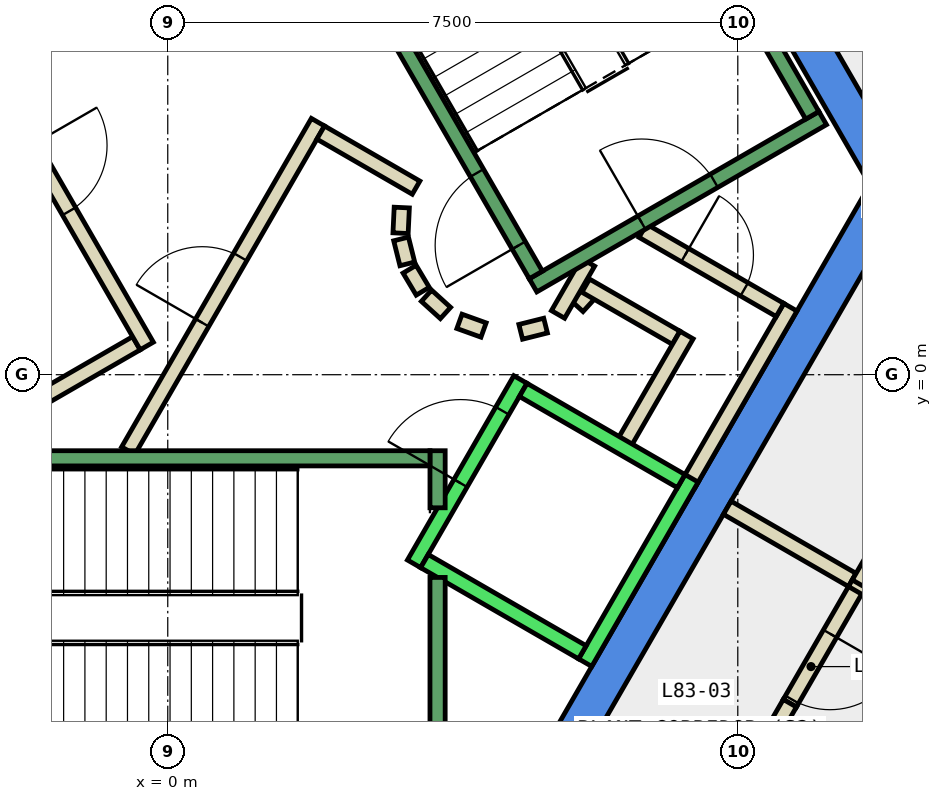
"""IFC4 building model, lengths in metres.
Left out: names, types, materials, properties, quantities, classifications, styles, units other than length and angle.
Written with IfcOpenShell. Run it as: python <this file> out.ifc"""

import sys

from ifc_helpers import new_model, si_unit, direction, frame, frame_2d, origin, place, context, subcontext, project, spatial, polyline, rectangle, outline, extrude, element, fill, save


model = new_model("IFC4")
c1 = context("Model", 3, precision=1e-05, world=origin(), true_north=direction((0.0, 1.0)))
c2 = subcontext(c1, "Body", "Model", "MODEL_VIEW")
j1 = project(units=[si_unit("LENGTHUNIT", "METRE"), si_unit("PLANEANGLEUNIT", "RADIAN")], contexts=[c1])
p1 = place(None, origin())
s1 = spatial("IfcSite", under=j1, at=p1, CompositionType="ELEMENT")
p2 = place(p1, origin())
s2 = spatial("IfcBuilding", under=s1, at=p2, CompositionType="ELEMENT")
p3 = place(p2, frame((0.0, 0.0, 353.9)))
s3 = spatial("IfcBuildingStorey", under=s2, at=p3, CompositionType="ELEMENT", Elevation=353.9)
p4 = place(p3, frame((0.0, 0.0, -0.35)))
e1 = element("IfcWall", 1, at=p4, inside=s3, PredefinedType="SHEAR", context=c2, shape_type="SweptSolid", body=[
    extrude(outline(polyline([(5.486, 9.998), (5.053, 9.748), (9.238, 2.5), (9.815, 2.5), (5.486, 9.998)])), origin(), (0.0, 0.0, 1.0), 4.4),
])
p5 = place(p3, frame((0.0, 0.0, -0.35)))
e2 = element("IfcWall", 2, at=p5, inside=s3, PredefinedType="SHEAR", context=c2, shape_type="SweptSolid", body=[
    extrude(outline(polyline([(4.907, -6.0), (9.815, 2.5), (9.238, 2.5), (4.619, -5.5), (4.907, -6.0)])), origin(), (0.0, 0.0, 1.0), 4.4),
])
p6 = place(p3, frame((5.39, 0.898, 0.0), z_axis=(0.0, 0.0, 1.0), x_axis=(0.673828488714, 0.738887791073, 0.0)))
e3 = element("IfcWall", 3, at=p6, inside=s3, PredefinedType="PARTITIONING", context=c2, shape_type="SweptSolid", body=[
    extrude(rectangle(XDim=0.263, YDim=0.2, at=frame_2d((0.131, 0.0))), origin(), (0.0, 0.0, 1.0), 4.05),
])
p7 = place(p3, frame((5.499, 1.172, 0.0), z_axis=(0.0, 0.0, 1.0), x_axis=(0.866333505267, -0.499465972466, 0.0)))
e4 = element("IfcWall", 4, at=p7, inside=s3, PredefinedType="PARTITIONING", context=c2, shape_type="SweptSolid", body=[
    extrude(rectangle(XDim=1.374, YDim=0.2, at=frame_2d((0.687, 0.0))), origin(), (0.0, 0.0, 1.0), 4.05),
])
p8 = place(p3, frame((6.826, 0.522, 0.0), z_axis=(0.0, 0.0, 1.0), x_axis=(-0.500016722714, -0.866015748706, 0.0)))
e5 = element("IfcWall", 5, at=p8, inside=s3, PredefinedType="PARTITIONING", context=c2, shape_type="SweptSolid", body=[
    extrude(rectangle(XDim=1.7, YDim=0.2, at=frame_2d((0.85, 0.0))), origin(), (0.0, 0.0, 1.0), 4.05),
])
p9 = place(p3, frame((8.192, 0.888, 0.0), z_axis=(0.0, 0.0, 1.0), x_axis=(-0.499940625693, -0.866059680843, 0.0)))
e6 = element("IfcWall", 6, at=p9, inside=s3, PredefinedType="PARTITIONING", context=c2, shape_type="SweptSolid", body=[
    extrude(rectangle(XDim=2.68, YDim=0.2, at=frame_2d((1.34, 0.0))), origin(), (0.0, 0.0, 1.0), 4.05),
])
p10 = place(p3, frame((5.135, 0.793, 0.0), z_axis=(0.0, 0.0, 1.0), x_axis=(0.499526442893, 0.866298639529, 0.0)))
e7 = element("IfcWall", 7, at=p10, inside=s3, PredefinedType="PARTITIONING", context=c2, shape_type="SweptSolid", body=[
    extrude(rectangle(XDim=0.791, YDim=0.2, at=frame_2d((0.396, 0.0))), origin(), (0.0, 0.0, 1.0), 4.05),
])
p11 = place(p3, frame((6.25, 1.894, 0.0), z_axis=(0.0, 0.0, 1.0), x_axis=(0.866043184279, -0.499969202016, 0.0)))
e8 = element("IfcWall", 8, at=p11, inside=s3, PredefinedType="PARTITIONING", context=c2, shape_type="SweptSolid", body=[
    extrude(rectangle(XDim=2.084, YDim=0.2, at=frame_2d((1.042, 0.0))), origin(), (0.0, 0.0, 1.0), 4.05),
])
p12 = place(p11, frame((0.642, 0.0, 0.0)))
e9 = element("IfcOpeningElement", 9, at=p12, cuts=e8, PredefinedType="OPENING", context=c2, shape_type="SweptSolid", body=[
    extrude(rectangle(XDim=0.9, YDim=2.1, at=frame_2d((0.45, 1.05))), frame((0.0, 0.11, 0.0), z_axis=(0.0, -1.0, 0.0), x_axis=(1.0, 0.0, 0.0)), (0.0, 0.0, 1.0), 0.22),
])
p13 = place(p3, frame((3.079, 2.199, 0.0), z_axis=(0.0, 0.0, 1.0), x_axis=(-0.047771483479, -0.998858290933, 0.0)))
e10 = element("IfcWall", 10, at=p13, inside=s3, PredefinedType="PARTITIONING", context=c2, shape_type="SweptSolid", body=[
    extrude(rectangle(XDim=0.337, YDim=0.2, at=frame_2d((0.169, 0.0))), origin(), (0.0, 0.0, 1.0), 4.05),
])
p14 = place(p3, frame((3.07, 1.786, 0.0), z_axis=(0.0, 0.0, 1.0), x_axis=(0.242705583207, -0.970099994784, 0.0)))
e11 = element("IfcWall", 11, at=p14, inside=s3, PredefinedType="PARTITIONING", context=c2, shape_type="SweptSolid", body=[
    extrude(rectangle(XDim=0.338, YDim=0.2, at=frame_2d((0.169, 0.0))), origin(), (0.0, 0.0, 1.0), 4.05),
])
for number, where, z_axis, x_axis in (
    (12, (3.182, 1.388, 0.0), (0.0, 0.0, 1.0), (0.512, -0.859, 0.0)),
    (13, (3.404, 1.039, 0.0), (0.0, 0.0, 1.0), (0.74, -0.672, 0.0)),
):
    element("IfcWall", number, at=place(p3, frame(where, z_axis=z_axis, x_axis=x_axis)), inside=s3, PredefinedType="PARTITIONING", context=c2, shape_type="SweptSolid", body=[
        extrude(rectangle(XDim=0.338, YDim=0.2, at=frame_2d((0.169, 0.0))), origin(), (0.0, 0.0, 1.0), 4.05),
    ])
p15 = place(p3, frame((3.838, 0.702, 0.0), z_axis=(0.0, 0.0, 1.0), x_axis=(0.941035081519, -0.338308993895, 0.0)))
e14 = element("IfcWall", 14, at=p15, inside=s3, PredefinedType="PARTITIONING", context=c2, shape_type="SweptSolid", body=[
    extrude(rectangle(XDim=0.337, YDim=0.2, at=frame_2d((0.168, 0.0))), origin(), (0.0, 0.0, 1.0), 4.05),
])
p16 = place(p3, frame((4.644, 0.564, 0.0), z_axis=(0.0, 0.0, 1.0), x_axis=(0.969929076366, 0.243387729394, 0.0)))
e15 = element("IfcWall", 15, at=p16, inside=s3, PredefinedType="PARTITIONING", context=c2, shape_type="SweptSolid", body=[
    extrude(rectangle(XDim=0.337, YDim=0.2, at=frame_2d((0.168, 0.0))), origin(), (0.0, 0.0, 1.0), 4.05),
])
p17 = place(p3, frame((-0.52, -1.0, 0.0), z_axis=(0.0, 0.0, 1.0), x_axis=(0.50011622646, 0.865958290007, 0.0)))
e16 = element("IfcWall", 16, at=p17, inside=s3, PredefinedType="PARTITIONING", context=c2, shape_type="SweptSolid", body=[
    extrude(rectangle(XDim=4.991, YDim=0.2, at=frame_2d((2.496, 0.0))), origin(), (0.0, 0.0, 1.0), 4.05),
])
p18 = place(p17, frame((1.945, 0.0, 0.0)))
e17 = element("IfcOpeningElement", 17, at=p18, cuts=e16, PredefinedType="OPENING", context=c2, shape_type="SweptSolid", body=[
    extrude(rectangle(XDim=1.0, YDim=2.1, at=frame_2d((0.5, 1.05))), frame((0.0, 0.11, 0.0), z_axis=(0.0, -1.0, 0.0), x_axis=(1.0, 0.0, 0.0)), (0.0, 0.0, 1.0), 0.22),
])
p19 = place(p3, frame((2.012, 3.186, 0.0), z_axis=(0.0, 0.0, 1.0), x_axis=(0.865891012941, -0.500232699559, 0.0)))
e18 = element("IfcWall", 18, at=p19, inside=s3, PredefinedType="PARTITIONING", context=c2, shape_type="SweptSolid", body=[
    extrude(rectangle(XDim=1.449, YDim=0.2, at=frame_2d((0.725, 0.0))), origin(), (0.0, 0.0, 1.0), 4.05),
])
p20 = place(p3, frame((-0.412, 0.414, 0.0), z_axis=(0.0, 0.0, 1.0), x_axis=(-0.866017369001, -0.500013916395, 0.0)))
e19 = element("IfcWall", 19, at=p20, inside=s3, PredefinedType="PARTITIONING", context=c2, shape_type="SweptSolid", body=[
    extrude(rectangle(XDim=1.45, YDim=0.2, at=frame_2d((0.725, 0.0))), origin(), (0.0, 0.0, 1.0), 4.05),
])
p21 = place(p3, frame((-2.771, 4.7, 0.0), z_axis=(0.0, 0.0, 1.0), x_axis=(0.499969479948, -0.866043023828, 0.0)))
e20 = element("IfcWall", 20, at=p21, inside=s3, PredefinedType="PARTITIONING", context=c2, shape_type="SweptSolid", body=[
    extrude(rectangle(XDim=4.99, YDim=0.2, at=frame_2d((2.495, 0.0))), origin(), (0.0, 0.0, 1.0), 4.05),
])
p22 = place(p21, frame((1.945, 0.0, 0.0)))
e21 = element("IfcOpeningElement", 21, at=p22, cuts=e20, PredefinedType="OPENING", context=c2, shape_type="SweptSolid", body=[
    extrude(rectangle(XDim=1.0, YDim=2.1, at=frame_2d((0.5, 1.05))), frame((0.0, 0.11, 0.0), z_axis=(0.0, -1.0, 0.0), x_axis=(1.0, 0.0, 0.0)), (0.0, 0.0, 1.0), 0.22),
])
p23 = place(p3, frame((9.093, -2.75, 0.0), z_axis=(0.0, 0.0, 1.0), x_axis=(-0.500145398563, -0.865941441609, 0.0)))
e22 = element("IfcWall", 22, at=p23, inside=s3, PredefinedType="PARTITIONING", context=c2, shape_type="SweptSolid", body=[
    extrude(rectangle(XDim=1.815, YDim=0.2, at=frame_2d((0.908, 0.0))), origin(), (0.0, 0.0, 1.0), 4.05),
])
p24 = place(p23, frame((0.759, 0.0, 0.0)))
e23 = element("IfcOpeningElement", 23, at=p24, cuts=e22, PredefinedType="OPENING", context=c2, shape_type="SweptSolid", body=[
    extrude(rectangle(XDim=1.0, YDim=2.1, at=frame_2d((0.5, 1.05))), frame((0.0, 0.11, 0.0), z_axis=(0.0, -1.0, 0.0), x_axis=(1.0, 0.0, 0.0)), (0.0, 0.0, 1.0), 0.22),
])
p25 = place(p3, frame((7.361, -1.75, 0.0), z_axis=(0.0, 0.0, 1.0), x_axis=(0.865980106173, -0.500078449558, 0.0)))
e24 = element("IfcWall", 24, at=p25, inside=s3, PredefinedType="PARTITIONING", context=c2, shape_type="SweptSolid", body=[
    extrude(rectangle(XDim=1.9, YDim=0.2, at=frame_2d((0.95, 0.0))), origin(), (0.0, 0.0, 1.0), 4.05),
])
p26 = place(p3, frame((9.006, -2.7, 0.0), z_axis=(0.0, 0.0, 1.0), x_axis=(0.866026229868, -0.499998569178, 0.0)))
e25 = element("IfcWall", 25, at=p26, inside=s3, PredefinedType="PARTITIONING", context=c2, shape_type="SweptSolid", body=[
    extrude(rectangle(XDim=8.572, YDim=0.2, at=frame_2d((4.286, 0.0))), origin(), (0.0, 0.0, 1.0), 4.05),
])
p27 = place(p3, frame((8.185, -4.322, 0.0), z_axis=(0.0, 0.0, 1.0), x_axis=(-0.500265973451, -0.865871789474, 0.0)))
e26 = element("IfcWall", 26, at=p27, inside=s3, PredefinedType="PARTITIONING", context=c2, shape_type="SweptSolid", body=[
    extrude(rectangle(XDim=0.7, YDim=0.2, at=frame_2d((0.35, 0.0))), origin(), (0.0, 0.0, 1.0), 1.95),
])
p28 = place(p3, frame((9.378, -2.257, 0.0), z_axis=(0.0, 0.0, 1.0), x_axis=(-0.500427620203, -0.86577837634, 0.0)))
e27 = element("IfcWall", 27, at=p28, inside=s3, PredefinedType="PARTITIONING", context=c2, shape_type="SweptSolid", body=[
    extrude(rectangle(XDim=0.569, YDim=0.2, at=frame_2d((0.285, 0.0))), origin(), (0.0, 0.0, 1.0), 4.05),
])
p29 = place(p3, frame((3.24, -2.488, 0.0), z_axis=(0.0, 0.0, 1.0), x_axis=(0.49994636267, 0.866056369097, 0.0)))
e28 = element("IfcWall", 28, at=p29, inside=s3, PredefinedType="STANDARD", context=c2, shape_type="SweptSolid", body=[
    extrude(rectangle(XDim=2.8, YDim=0.2, at=frame_2d((1.4, 0.0))), origin(), (0.0, 0.0, 1.0), 4.05),
])
p30 = place(p29, frame((1.225, 0.0, 0.0)))
e29 = element("IfcOpeningElement", 29, at=p30, cuts=e28, PredefinedType="OPENING", context=c2, shape_type="SweptSolid", body=[
    extrude(rectangle(XDim=1.1, YDim=2.1, at=frame_2d((0.55, 1.05))), frame((0.0, 0.11, 0.0), z_axis=(0.0, -1.0, 0.0), x_axis=(1.0, 0.0, 0.0)), (0.0, 0.0, 1.0), 0.22),
])
p31 = place(p3, frame((5.492, -3.788, 0.0), z_axis=(0.0, 0.0, 1.0), x_axis=(0.500011755427, 0.866018616679, 0.0)))
e30 = element("IfcWall", 30, at=p31, inside=s3, PredefinedType="STANDARD", context=c2, shape_type="SweptSolid", body=[
    extrude(rectangle(XDim=2.8, YDim=0.2, at=frame_2d((1.4, 0.0))), origin(), (0.0, 0.0, 1.0), 4.05),
])
p32 = place(p3, frame((3.377, -2.452, 0.0), z_axis=(0.0, 0.0, 1.0), x_axis=(0.865955154139, -0.50012165622, 0.0)))
e31 = element("IfcWall", 31, at=p32, inside=s3, PredefinedType="STANDARD", context=c2, shape_type="SweptSolid", body=[
    extrude(rectangle(XDim=2.4, YDim=0.2, at=frame_2d((1.2, 0.0))), origin(), (0.0, 0.0, 1.0), 4.05),
])
p33 = place(p3, frame((4.677, -0.2, 0.0), z_axis=(0.0, 0.0, 1.0), x_axis=(0.865973769406, -0.500089422704, 0.0)))
e32 = element("IfcWall", 32, at=p33, inside=s3, PredefinedType="STANDARD", context=c2, shape_type="SweptSolid", body=[
    extrude(rectangle(XDim=2.399, YDim=0.2, at=frame_2d((1.2, 0.0))), origin(), (0.0, 0.0, 1.0), 4.05),
])
p34 = place(p3, frame((3.55, -2.667, 0.0), z_axis=(0.0, 0.0, 1.0), x_axis=(0.0, -1.0, 0.0)))
e33 = element("IfcWall", 33, at=p34, inside=s3, PredefinedType="STANDARD", context=c2, shape_type="SweptSolid", body=[
    extrude(rectangle(XDim=2.733, YDim=0.2, at=frame_2d((1.366, 0.0))), origin(), (0.0, 0.0, 1.0), 4.05),
])
p35 = place(p3, frame((3.55, -1.0, 0.0), z_axis=(0.0, 0.0, 1.0), x_axis=(0.0, -1.0, 0.0)))
e34 = element("IfcWall", 34, at=p35, inside=s3, PredefinedType="STANDARD", context=c2, shape_type="SweptSolid", body=[
    extrude(rectangle(XDim=0.751, YDim=0.2, at=frame_2d((0.375, 0.0))), origin(), (0.0, 0.0, 1.0), 4.05),
])
p36 = place(p3, frame((-3.45, -1.1, 0.0), z_axis=(0.0, 0.0, 1.0), x_axis=(1.0, 0.0, 0.0)))
e35 = element("IfcWall", 35, at=p36, inside=s3, PredefinedType="STANDARD", context=c2, shape_type="SweptSolid", body=[
    extrude(rectangle(XDim=6.9, YDim=0.2, at=frame_2d((3.45, 0.0))), origin(), (0.0, 0.0, 1.0), 4.05),
])
p37 = place(p36, frame((0.45, 0.0, 0.0)))
e36 = element("IfcOpeningElement", 36, at=p37, cuts=e35, PredefinedType="OPENING", context=c2, shape_type="SweptSolid", body=[
    extrude(rectangle(XDim=1.1, YDim=2.2, at=frame_2d((0.55, 1.1))), frame((0.0, 0.11, 0.0), z_axis=(0.0, -1.0, 0.0), x_axis=(1.0, 0.0, 0.0)), (0.0, 0.0, 1.0), 0.22),
])
p38 = place(p3, frame((4.806, 1.176, 0.0), z_axis=(0.0, 0.0, 1.0), x_axis=(0.866059941101, 0.499940174841, 0.0)))
e37 = element("IfcWall", 37, at=p38, inside=s3, PredefinedType="STANDARD", context=c2, shape_type="SweptSolid", body=[
    extrude(rectangle(XDim=4.4, YDim=0.2, at=frame_2d((2.2, 0.0))), origin(), (0.0, 0.0, 1.0), 4.05),
])
p39 = place(p38, frame((1.65, 0.0, 0.0)))
e38 = element("IfcOpeningElement", 38, at=p39, cuts=e37, PredefinedType="OPENING", context=c2, shape_type="SweptSolid", body=[
    extrude(rectangle(XDim=1.1, YDim=2.2, at=frame_2d((0.55, 1.1))), frame((0.0, 0.11, 0.0), z_axis=(0.0, -1.0, 0.0), x_axis=(1.0, 0.0, 0.0)), (0.0, 0.0, 1.0), 0.22),
])
p40 = place(p3, frame((4.843, 1.312, 0.0), z_axis=(0.0, 0.0, 1.0), x_axis=(-0.499963383562, 0.866046543262, 0.0)))
e39 = element("IfcWall", 39, at=p40, inside=s3, PredefinedType="STANDARD", context=c2, shape_type="SweptSolid", body=[
    extrude(rectangle(XDim=6.9, YDim=0.2, at=frame_2d((3.45, 0.0))), origin(), (0.0, 0.0, 1.0), 4.05),
])
p41 = place(p40, frame((0.45, 0.0, 0.0)))
e40 = element("IfcOpeningElement", 40, at=p41, cuts=e39, PredefinedType="OPENING", context=c2, shape_type="SweptSolid", body=[
    extrude(rectangle(XDim=1.1, YDim=2.2, at=frame_2d((0.55, 1.1))), frame((0.0, 0.11, 0.0), z_axis=(0.0, -1.0, 0.0), x_axis=(1.0, 0.0, 0.0)), (0.0, 0.0, 1.0), 0.22),
])
p42 = place(p3, frame((8.48, 3.412, 0.0), z_axis=(0.0, 0.0, 1.0), x_axis=(-0.499978703459, 0.866037698999, 0.0)))
e41 = element("IfcWall", 41, at=p42, inside=s3, PredefinedType="STANDARD", context=c2, shape_type="SweptSolid", body=[
    extrude(rectangle(XDim=6.9, YDim=0.2, at=frame_2d((3.45, 0.0))), origin(), (0.0, 0.0, 1.0), 4.05),
])
p43 = place(p3, frame((-1.393, 7.288, 0.0), z_axis=(0.0, 0.0, 1.0), x_axis=(-0.499963383562, -0.866046543262, 0.0)))
e42 = element("IfcWall", 42, at=p43, inside=s3, PredefinedType="STANDARD", context=c2, shape_type="SweptSolid", body=[
    extrude(rectangle(XDim=6.9, YDim=0.2, at=frame_2d((3.45, 0.0))), origin(), (0.0, 0.0, 1.0), 4.05),
])
p44 = place(p43, frame((0.45, 0.0, 0.0)))
e43 = element("IfcOpeningElement", 43, at=p44, cuts=e42, PredefinedType="OPENING", context=c2, shape_type="SweptSolid", body=[
    extrude(rectangle(XDim=1.1, YDim=2.2, at=frame_2d((0.55, 1.1))), frame((0.0, 0.11, 0.0), z_axis=(0.0, -1.0, 0.0), x_axis=(1.0, 0.0, 0.0)), (0.0, 0.0, 1.0), 0.22),
])
p45 = place(p24, origin())
e44 = element("IfcDoor", 44, at=p45, inside=s3, OperationType="SINGLE_SWING_LEFT", PredefinedType="DOOR", context=c2, shape_type="SweptSolid", body=[
    extrude(rectangle(XDim=1.0, YDim=2.1, at=frame_2d((0.5, 1.05))), frame((0.0, 0.025, 0.0), z_axis=(0.0, -1.0, 0.0), x_axis=(1.0, 0.0, 0.0)), (0.0, 0.0, 1.0), 0.05),
])
fill(e23, e44)
p46 = place(p18, origin())
e45 = element("IfcDoor", 45, at=p46, inside=s3, OperationType="SINGLE_SWING_LEFT", PredefinedType="DOOR", context=c2, shape_type="SweptSolid", body=[
    extrude(rectangle(XDim=1.0, YDim=2.1, at=frame_2d((0.5, 1.05))), frame((0.0, 0.025, 0.0), z_axis=(0.0, -1.0, 0.0), x_axis=(1.0, 0.0, 0.0)), (0.0, 0.0, 1.0), 0.05),
])
fill(e17, e45)
p47 = place(p22, origin())
e46 = element("IfcDoor", 46, at=p47, inside=s3, OperationType="SINGLE_SWING_RIGHT", PredefinedType="DOOR", context=c2, shape_type="SweptSolid", body=[
    extrude(rectangle(XDim=1.0, YDim=2.1, at=frame_2d((0.5, 1.05))), frame((0.0, 0.025, 0.0), z_axis=(0.0, -1.0, 0.0), x_axis=(1.0, 0.0, 0.0)), (0.0, 0.0, 1.0), 0.05),
])
fill(e21, e46)
p48 = place(p12, origin())
e47 = element("IfcDoor", 47, at=p48, inside=s3, OperationType="SINGLE_SWING_LEFT", PredefinedType="DOOR", context=c2, shape_type="SweptSolid", body=[
    extrude(rectangle(XDim=0.9, YDim=2.1, at=frame_2d((0.45, 1.05))), frame((0.0, 0.025, 0.0), z_axis=(0.0, -1.0, 0.0), x_axis=(1.0, 0.0, 0.0)), (0.0, 0.0, 1.0), 0.05),
])
fill(e9, e47)
p49 = place(p30, origin())
e48 = element("IfcDoor", 48, at=p49, inside=s3, OperationType="SLIDING_TO_LEFT", PredefinedType="DOOR", context=c2, shape_type="SweptSolid", body=[
    extrude(rectangle(XDim=1.1, YDim=2.1, at=frame_2d((0.55, 1.05))), frame((0.0, 0.025, 0.0), z_axis=(0.0, -1.0, 0.0), x_axis=(1.0, 0.0, 0.0)), (0.0, 0.0, 1.0), 0.05),
])
fill(e29, e48)
p50 = place(p41, origin())
e49 = element("IfcDoor", 49, at=p50, inside=s3, OperationType="SINGLE_SWING_LEFT", PredefinedType="DOOR", context=c2, shape_type="SweptSolid", body=[
    extrude(rectangle(XDim=1.1, YDim=2.2, at=frame_2d((0.55, 1.1))), frame((0.0, 0.025, 0.0), z_axis=(0.0, -1.0, 0.0), x_axis=(1.0, 0.0, 0.0)), (0.0, 0.0, 1.0), 0.05),
])
fill(e40, e49)
p51 = place(p39, origin())
e50 = element("IfcDoor", 50, at=p51, inside=s3, OperationType="SINGLE_SWING_LEFT", PredefinedType="DOOR", context=c2, shape_type="SweptSolid", body=[
    extrude(rectangle(XDim=1.1, YDim=2.2, at=frame_2d((0.55, 1.1))), frame((0.0, 0.025, 0.0), z_axis=(0.0, -1.0, 0.0), x_axis=(1.0, 0.0, 0.0)), (0.0, 0.0, 1.0), 0.05),
])
fill(e38, e50)
save(model, sys.argv[1])
